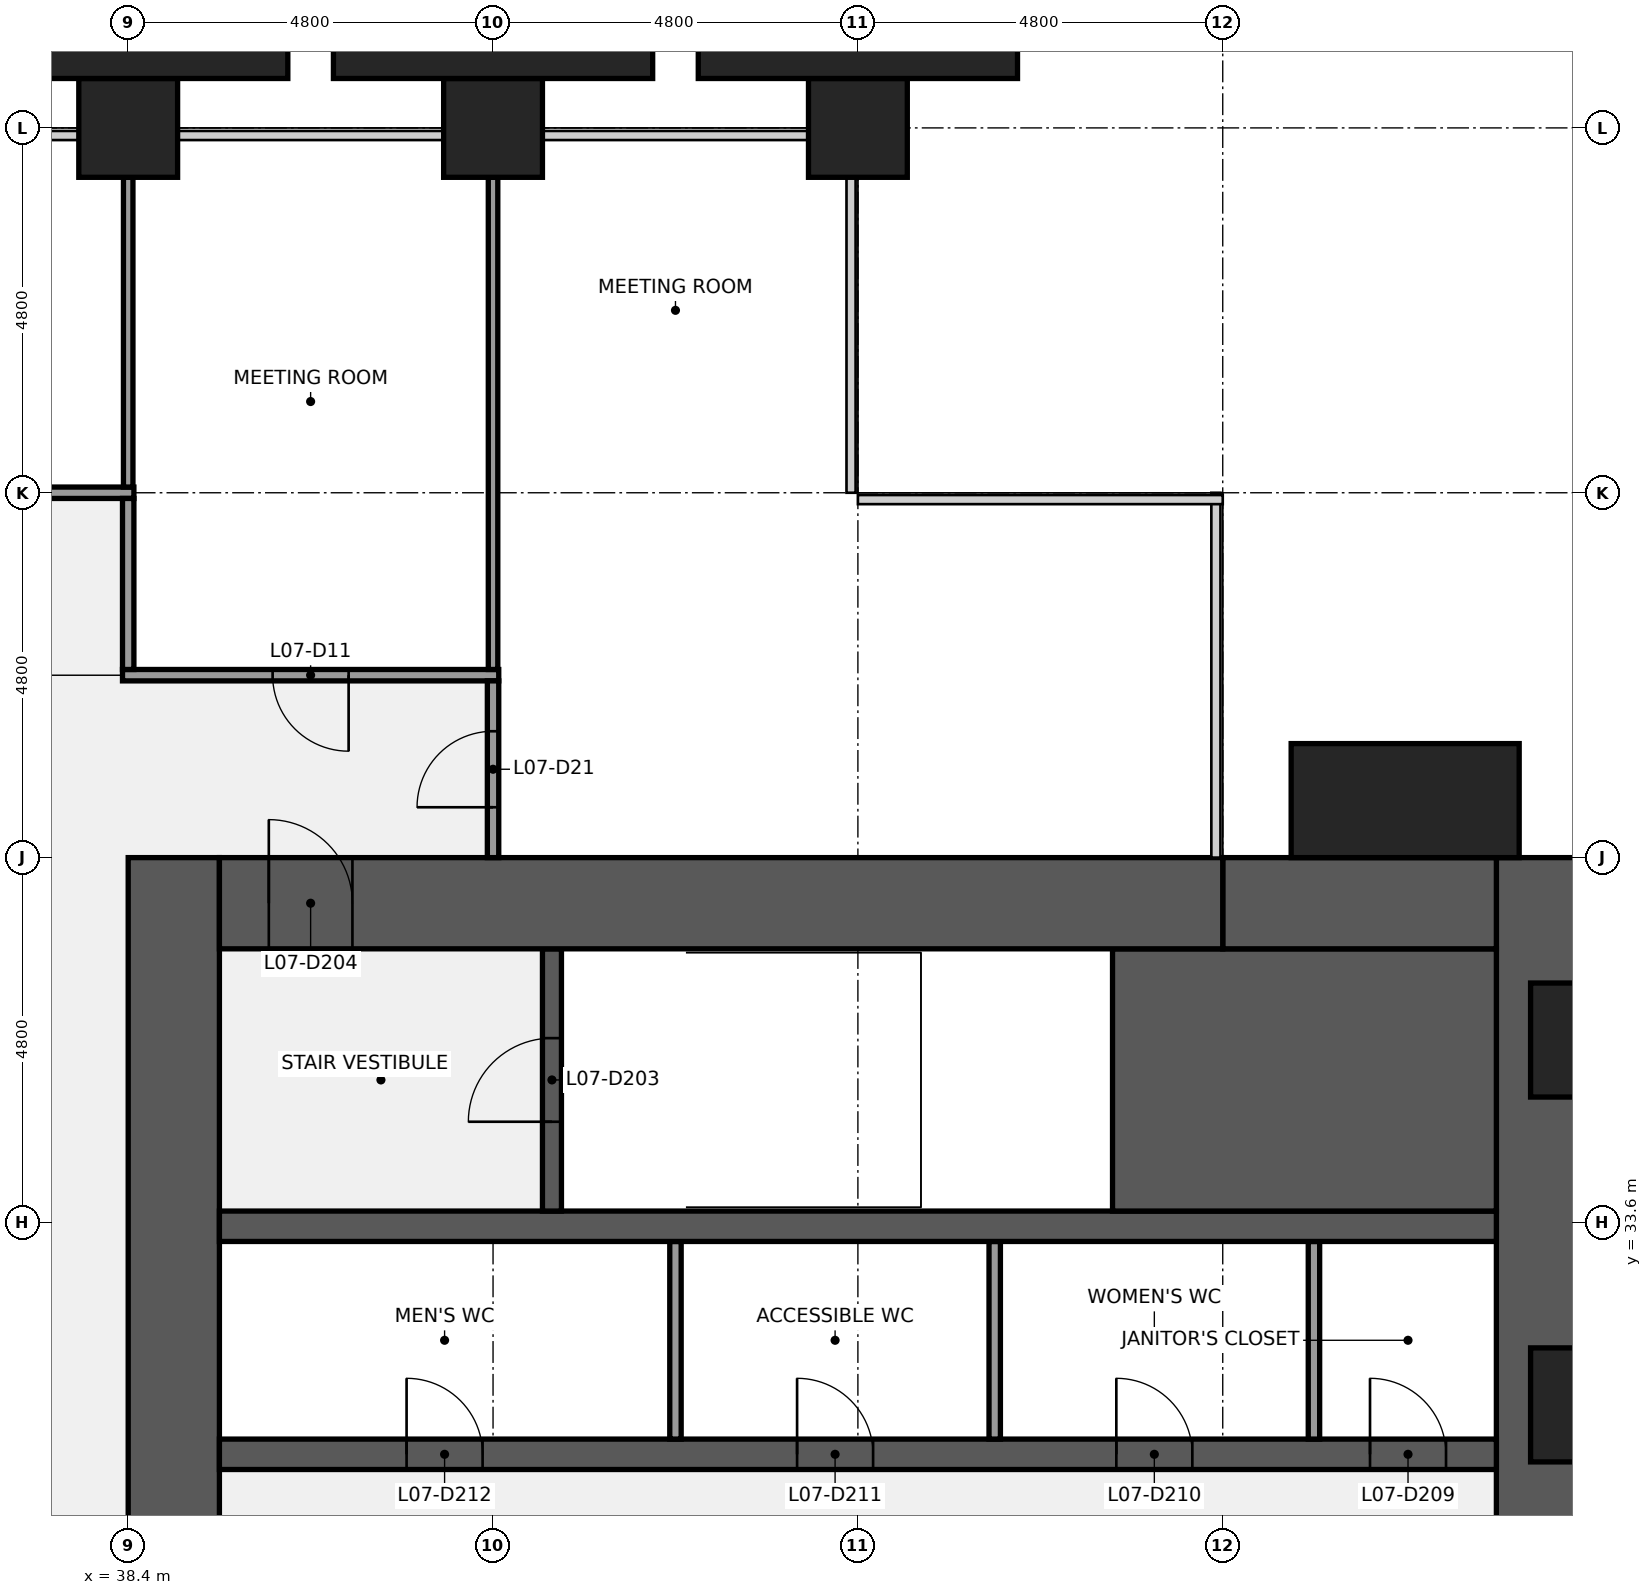
"""IFC4 building model, lengths in metres.
Left out: names, types, materials, properties, quantities, classifications, styles, units other than length and angle.
Written with IfcOpenShell. Run it as: python <this file> out.ifc"""

import sys

from ifc_helpers import new_model, si_unit, direction, frame, frame_2d, origin, origin_2d, place, context, subcontext, project, spatial, rectangle, extrude, element, fill, save


model = new_model("IFC4")
c1 = context("Model", 3, precision=1e-05, world=origin(), true_north=direction((0.0, 1.0)))
c2 = subcontext(c1, "Body", "Model", "MODEL_VIEW")
j1 = project(units=[si_unit("LENGTHUNIT", "METRE"), si_unit("PLANEANGLEUNIT", "RADIAN")], contexts=[c1])
p1 = place(None, origin())
s1 = spatial("IfcSite", under=j1, at=p1, CompositionType="ELEMENT")
p2 = place(p1, origin())
s2 = spatial("IfcBuilding", under=s1, at=p2, CompositionType="ELEMENT")
p3 = place(p2, frame((0.0, 0.0, 39.0)))
s3 = spatial("IfcBuildingStorey", under=s2, at=p3, CompositionType="ELEMENT", Elevation=39.0)
for number, where, z_axis, x_axis in (
    (1, (38.4, 48.0, 0.0), (0.0, 0.0, 1.0), (1.0, 0.0, 0.0)),
    (2, (43.2, 48.0, 0.0), (0.0, 0.0, 1.0), (1.0, 0.0, 0.0)),
    (3, (48.0, 48.0, 0.0), (0.0, 0.0, 1.0), (1.0, 0.0, 0.0)),
):
    element("IfcColumn", number, at=place(p3, frame(where, z_axis=z_axis, x_axis=x_axis)), inside=s3, PredefinedType="COLUMN", context=c2, shape_type="SweptSolid", body=[
        extrude(rectangle(XDim=1.3, YDim=1.3, at=origin_2d()), origin(), (0.0, 0.0, 1.0), 4.0),
    ])
p4 = place(p3, frame((57.0, 38.4, 0.0), z_axis=(0.0, 0.0, 1.0), x_axis=(0.0, -1.0, 0.0)))
e4 = element("IfcWall", 4, at=p4, inside=s3, PredefinedType="SHEAR", context=c2, shape_type="SweptSolid", body=[
    extrude(rectangle(XDim=28.8, YDim=1.2, at=frame_2d((14.4, 0.0))), origin(), (0.0, 0.0, 1.0), 3.84),
])
p5 = place(p4, frame((18.45, 0.0, 0.9)))
e5 = element("IfcOpeningElement", 5, at=p5, cuts=e4, PredefinedType="OPENING", context=c2, shape_type="SweptSolid", body=[
    extrude(rectangle(XDim=1.5, YDim=1.5, at=frame_2d((0.75, 0.75))), frame((0.0, 0.61, 0.0), z_axis=(0.0, -1.0, 0.0), x_axis=(1.0, 0.0, 0.0)), (0.0, 0.0, 1.0), 1.22),
])
p6 = place(p4, frame((8.85, 0.0, 0.9)))
e6 = element("IfcOpeningElement", 6, at=p6, cuts=e4, PredefinedType="OPENING", context=c2, shape_type="SweptSolid", body=[
    extrude(rectangle(XDim=1.5, YDim=1.5, at=frame_2d((0.75, 0.75))), frame((0.0, 0.61, 0.0), z_axis=(0.0, -1.0, 0.0), x_axis=(1.0, 0.0, 0.0)), (0.0, 0.0, 1.0), 1.22),
])
p7 = place(p3, frame((39.0, 9.6, 0.0), z_axis=(0.0, 0.0, 1.0), x_axis=(0.0, 1.0, 0.0)))
e7 = element("IfcWall", 7, at=p7, inside=s3, PredefinedType="SHEAR", context=c2, shape_type="SweptSolid", body=[
    extrude(rectangle(XDim=28.8, YDim=1.2, at=frame_2d((14.4, 0.0))), origin(), (0.0, 0.0, 1.0), 3.84),
])
p8 = place(p7, frame((8.7, 0.0, 0.0)))
e8 = element("IfcOpeningElement", 8, at=p8, cuts=e7, PredefinedType="OPENING", context=c2, shape_type="SweptSolid", body=[
    extrude(rectangle(XDim=1.8, YDim=2.1, at=frame_2d((0.9, 1.05))), frame((0.0, 0.61, 0.0), z_axis=(0.0, -1.0, 0.0), x_axis=(1.0, 0.0, 0.0)), (0.0, 0.0, 1.0), 1.22),
])
p9 = place(p7, frame((18.3, 0.0, 0.0)))
e9 = element("IfcOpeningElement", 9, at=p9, cuts=e7, PredefinedType="OPENING", context=c2, shape_type="SweptSolid", body=[
    extrude(rectangle(XDim=1.8, YDim=2.1, at=frame_2d((0.9, 1.05))), frame((0.0, 0.61, 0.0), z_axis=(0.0, -1.0, 0.0), x_axis=(1.0, 0.0, 0.0)), (0.0, 0.0, 1.0), 1.22),
])
p10 = place(p3, frame((39.6, 30.55, 0.0), z_axis=(0.0, 0.0, 1.0), x_axis=(1.0, 0.0, 0.0)))
e10 = element("IfcWall", 10, at=p10, inside=s3, PredefinedType="SHEAR", context=c2, shape_type="SweptSolid", body=[
    extrude(rectangle(XDim=16.8, YDim=0.4, at=frame_2d((8.4, 0.0))), origin(), (0.0, 0.0, 1.0), 3.84),
])
p11 = place(p10, frame((15.137, 0.0, 0.0)))
e11 = element("IfcOpeningElement", 11, at=p11, cuts=e10, PredefinedType="OPENING", context=c2, shape_type="SweptSolid", body=[
    extrude(rectangle(XDim=1.0, YDim=2.1, at=frame_2d((0.5, 1.05))), frame((0.0, 0.21, 0.0), z_axis=(0.0, -1.0, 0.0), x_axis=(1.0, 0.0, 0.0)), (0.0, 0.0, 1.0), 0.42),
])
p12 = place(p10, frame((11.8, 0.0, 0.0)))
e12 = element("IfcOpeningElement", 12, at=p12, cuts=e10, PredefinedType="OPENING", context=c2, shape_type="SweptSolid", body=[
    extrude(rectangle(XDim=1.0, YDim=2.1, at=frame_2d((0.5, 1.05))), frame((0.0, 0.21, 0.0), z_axis=(0.0, -1.0, 0.0), x_axis=(1.0, 0.0, 0.0)), (0.0, 0.0, 1.0), 0.42),
])
p13 = place(p10, frame((7.6, 0.0, 0.0)))
e13 = element("IfcOpeningElement", 13, at=p13, cuts=e10, PredefinedType="OPENING", context=c2, shape_type="SweptSolid", body=[
    extrude(rectangle(XDim=1.0, YDim=2.1, at=frame_2d((0.5, 1.05))), frame((0.0, 0.21, 0.0), z_axis=(0.0, -1.0, 0.0), x_axis=(1.0, 0.0, 0.0)), (0.0, 0.0, 1.0), 0.42),
])
p14 = place(p10, frame((2.462, 0.0, 0.0)))
e14 = element("IfcOpeningElement", 14, at=p14, cuts=e10, PredefinedType="OPENING", context=c2, shape_type="SweptSolid", body=[
    extrude(rectangle(XDim=1.0, YDim=2.1, at=frame_2d((0.5, 1.05))), frame((0.0, 0.21, 0.0), z_axis=(0.0, -1.0, 0.0), x_axis=(1.0, 0.0, 0.0)), (0.0, 0.0, 1.0), 0.42),
])
for number, where, z_axis, x_axis in (
    (15, (54.0, 30.75, 0.0), (0.0, 0.0, 1.0), (0.0, 1.0, 0.0)),
    (16, (49.8, 30.75, 0.0), (0.0, 0.0, 1.0), (0.0, 1.0, 0.0)),
    (17, (45.6, 30.75, 0.0), (0.0, 0.0, 1.0), (0.0, 1.0, 0.0)),
):
    element("IfcWall", number, at=place(p3, frame(where, z_axis=z_axis, x_axis=x_axis)), inside=s3, PredefinedType="PARTITIONING", context=c2, shape_type="SweptSolid", body=[
        extrude(rectangle(XDim=2.6, YDim=0.15, at=frame_2d((1.3, 0.0))), origin(), (0.0, 0.0, 1.0), 3.84),
    ])
p15 = place(p3, frame((39.6, 33.55, 0.0), z_axis=(0.0, 0.0, 1.0), x_axis=(1.0, 0.0, 0.0)))
e18 = element("IfcWall", 18, at=p15, inside=s3, PredefinedType="SHEAR", context=c2, shape_type="SweptSolid", body=[
    extrude(rectangle(XDim=16.8, YDim=0.4, at=frame_2d((8.4, 0.0))), origin(), (0.0, 0.0, 1.0), 3.84),
])
p16 = place(p3, frame((51.35, 35.475, 0.0), z_axis=(0.0, 0.0, 1.0), x_axis=(1.0, 0.0, 0.0)))
e19 = element("IfcWall", 19, at=p16, inside=s3, PredefinedType="SHEAR", context=c2, shape_type="SweptSolid", body=[
    extrude(rectangle(XDim=5.05, YDim=3.45, at=frame_2d((2.525, 0.0))), origin(), (0.0, 0.0, 1.0), 3.84),
])
p17 = place(p3, frame((43.975, 33.75, 0.0), z_axis=(0.0, 0.0, 1.0), x_axis=(0.0, 1.0, 0.0)))
e20 = element("IfcWall", 20, at=p17, inside=s3, PredefinedType="SHEAR", context=c2, shape_type="SweptSolid", body=[
    extrude(rectangle(XDim=3.45, YDim=0.25, at=frame_2d((1.725, 0.0))), origin(), (0.0, 0.0, 1.0), 3.84),
])
p18 = place(p17, frame((1.175, 0.0, 0.0)))
e21 = element("IfcOpeningElement", 21, at=p18, cuts=e20, PredefinedType="OPENING", context=c2, shape_type="SweptSolid", body=[
    extrude(rectangle(XDim=1.1, YDim=2.1, at=frame_2d((0.55, 1.05))), frame((0.0, 0.135, 0.0), z_axis=(0.0, -1.0, 0.0), x_axis=(1.0, 0.0, 0.0)), (0.0, 0.0, 1.0), 0.27),
])
p19 = place(p3, frame((52.8, 37.8, 0.0), z_axis=(0.0, 0.0, 1.0), x_axis=(1.0, 0.0, 0.0)))
e22 = element("IfcWall", 22, at=p19, inside=s3, PredefinedType="SHEAR", context=c2, shape_type="SweptSolid", body=[
    extrude(rectangle(XDim=3.6, YDim=1.2, at=frame_2d((1.8, 0.0))), origin(), (0.0, 0.0, 1.0), 3.84),
])
p20 = place(p3, frame((39.6, 37.8, 0.0), z_axis=(0.0, 0.0, 1.0), x_axis=(1.0, 0.0, 0.0)))
e23 = element("IfcWall", 23, at=p20, inside=s3, PredefinedType="SHEAR", context=c2, shape_type="SweptSolid", body=[
    extrude(rectangle(XDim=13.2, YDim=1.2, at=frame_2d((6.6, 0.0))), origin(), (0.0, 0.0, 1.0), 3.84),
])
p21 = place(p20, frame((0.65, 0.0, 0.0)))
e24 = element("IfcOpeningElement", 24, at=p21, cuts=e23, PredefinedType="OPENING", context=c2, shape_type="SweptSolid", body=[
    extrude(rectangle(XDim=1.1, YDim=2.1, at=frame_2d((0.55, 1.05))), frame((0.0, 0.61, 0.0), z_axis=(0.0, -1.0, 0.0), x_axis=(1.0, 0.0, 0.0)), (0.0, 0.0, 1.0), 1.22),
])
p22 = place(p3, frame((38.325, 40.8, 0.0), z_axis=(0.0, 0.0, 1.0), x_axis=(1.0, 0.0, 0.0)))
e25 = element("IfcWall", 25, at=p22, inside=s3, PredefinedType="PARTITIONING", context=c2, shape_type="SweptSolid", body=[
    extrude(rectangle(XDim=4.95, YDim=0.15, at=frame_2d((2.475, 0.0))), origin(), (0.0, 0.0, 1.0), 2.87),
])
p23 = place(p22, frame((1.975, 0.0, 0.0)))
e26 = element("IfcOpeningElement", 26, at=p23, cuts=e25, PredefinedType="OPENING", context=c2, shape_type="SweptSolid", body=[
    extrude(rectangle(XDim=1.0, YDim=2.1, at=frame_2d((0.5, 1.05))), frame((0.0, 0.085, 0.0), z_axis=(0.0, -1.0, 0.0), x_axis=(1.0, 0.0, 0.0)), (0.0, 0.0, 1.0), 0.17),
])
p24 = place(p3, frame((19.125, 43.2, 0.0), z_axis=(0.0, 0.0, 1.0), x_axis=(1.0, 0.0, 0.0)))
e27 = element("IfcWall", 27, at=p24, inside=s3, PredefinedType="PARTITIONING", context=c2, shape_type="SweptSolid", body=[
    extrude(rectangle(XDim=19.35, YDim=0.15, at=frame_2d((9.675, 0.0))), origin(), (0.0, 0.0, 1.0), 2.87),
])
p25 = place(p24, frame((9.175, 0.0, 0.0)))
e28 = element("IfcOpeningElement", 28, at=p25, cuts=e27, PredefinedType="OPENING", context=c2, shape_type="SweptSolid", body=[
    extrude(rectangle(XDim=1.0, YDim=2.1, at=frame_2d((0.5, 1.05))), frame((0.0, 0.085, 0.0), z_axis=(0.0, -1.0, 0.0), x_axis=(1.0, 0.0, 0.0)), (0.0, 0.0, 1.0), 0.17),
])
p26 = place(p3, frame((38.4, 43.275, 0.0), z_axis=(0.0, 0.0, 1.0), x_axis=(0.0, 1.0, 0.0)))
e29 = element("IfcWall", 29, at=p26, inside=s3, PredefinedType="PARTITIONING", context=c2, shape_type="SweptSolid", body=[
    extrude(rectangle(XDim=4.075, YDim=0.125, at=frame_2d((2.038, 0.0))), origin(), (0.0, 0.0, 1.0), 2.87),
])
p27 = place(p3, frame((38.4, 40.875, 0.0), z_axis=(0.0, 0.0, 1.0), x_axis=(0.0, 1.0, 0.0)))
e30 = element("IfcWall", 30, at=p27, inside=s3, PredefinedType="PARTITIONING", context=c2, shape_type="SweptSolid", body=[
    extrude(rectangle(XDim=2.25, YDim=0.15, at=frame_2d((1.125, 0.0))), origin(), (0.0, 0.0, 1.0), 2.87),
])
p28 = place(p3, frame((43.2, 40.875, 0.0), z_axis=(0.0, 0.0, 1.0), x_axis=(0.0, 1.0, 0.0)))
e31 = element("IfcWall", 31, at=p28, inside=s3, PredefinedType="PARTITIONING", context=c2, shape_type="SweptSolid", body=[
    extrude(rectangle(XDim=6.475, YDim=0.125, at=frame_2d((3.238, 0.0))), origin(), (0.0, 0.0, 1.0), 2.87),
])
p29 = place(p3, frame((43.2, 38.4, 0.0), z_axis=(0.0, 0.0, 1.0), x_axis=(0.0, 1.0, 0.0)))
e32 = element("IfcWall", 32, at=p29, inside=s3, PredefinedType="PARTITIONING", context=c2, shape_type="SweptSolid", body=[
    extrude(rectangle(XDim=2.325, YDim=0.15, at=frame_2d((1.163, 0.0))), origin(), (0.0, 0.0, 1.0), 2.87),
])
p30 = place(p29, frame((0.663, 0.0, 0.0)))
e33 = element("IfcOpeningElement", 33, at=p30, cuts=e32, PredefinedType="OPENING", context=c2, shape_type="SweptSolid", body=[
    extrude(rectangle(XDim=1.0, YDim=2.1, at=frame_2d((0.5, 1.05))), frame((0.0, 0.085, 0.0), z_axis=(0.0, -1.0, 0.0), x_axis=(1.0, 0.0, 0.0)), (0.0, 0.0, 1.0), 0.17),
])
p31 = place(p3, frame((55.2, 39.15, 0.0), z_axis=(0.0, 0.0, 1.0), x_axis=(1.0, 0.0, 0.0)))
e34 = element("IfcColumn", 34, at=p31, inside=s3, PredefinedType="PILASTER", context=c2, shape_type="SweptSolid", body=[
    extrude(rectangle(XDim=3.0, YDim=1.5, at=origin_2d()), origin(), (0.0, 0.0, 1.0), 4.0),
])
for number, where, z_axis, x_axis in (
    (35, (38.4, 49.075, 0.0), (0.0, 0.0, 1.0), (1.0, 0.0, 0.0)),
    (36, (43.2, 49.075, 0.0), (0.0, 0.0, 1.0), (1.0, 0.0, 0.0)),
    (37, (48.0, 49.075, 0.0), (0.0, 0.0, 1.0), (1.0, 0.0, 0.0)),
):
    element("IfcColumn", number, at=place(p3, frame(where, z_axis=z_axis, x_axis=x_axis)), inside=s3, PredefinedType="PILASTER", context=c2, shape_type="SweptSolid", body=[
        extrude(rectangle(XDim=4.2, YDim=0.85, at=origin_2d()), origin(), (0.0, 0.0, 1.0), 4.0),
    ])
p32 = place(p18, origin())
e38 = element("IfcDoor", 38, at=p32, inside=s3, OperationType="SINGLE_SWING_LEFT", PredefinedType="DOOR", context=c2, shape_type="SweptSolid", body=[
    extrude(rectangle(XDim=1.1, YDim=2.1, at=frame_2d((0.55, 1.05))), frame((0.0, 0.025, 0.0), z_axis=(0.0, -1.0, 0.0), x_axis=(1.0, 0.0, 0.0)), (0.0, 0.0, 1.0), 0.05),
])
fill(e21, e38)
p33 = place(p21, origin())
e39 = element("IfcDoor", 39, at=p33, inside=s3, OperationType="SINGLE_SWING_LEFT", PredefinedType="DOOR", context=c2, shape_type="SweptSolid", body=[
    extrude(rectangle(XDim=1.1, YDim=2.1, at=frame_2d((0.55, 1.05))), frame((0.0, 0.025, 0.0), z_axis=(0.0, -1.0, 0.0), x_axis=(1.0, 0.0, 0.0)), (0.0, 0.0, 1.0), 0.05),
])
fill(e24, e39)
p34 = place(p11, origin())
e40 = element("IfcDoor", 40, at=p34, inside=s3, OperationType="SINGLE_SWING_LEFT", PredefinedType="DOOR", context=c2, shape_type="SweptSolid", body=[
    extrude(rectangle(XDim=1.0, YDim=2.1, at=frame_2d((0.5, 1.05))), frame((0.0, 0.025, 0.0), z_axis=(0.0, -1.0, 0.0), x_axis=(1.0, 0.0, 0.0)), (0.0, 0.0, 1.0), 0.05),
])
fill(e11, e40)
p35 = place(p12, origin())
e41 = element("IfcDoor", 41, at=p35, inside=s3, OperationType="SINGLE_SWING_LEFT", PredefinedType="DOOR", context=c2, shape_type="SweptSolid", body=[
    extrude(rectangle(XDim=1.0, YDim=2.1, at=frame_2d((0.5, 1.05))), frame((0.0, 0.025, 0.0), z_axis=(0.0, -1.0, 0.0), x_axis=(1.0, 0.0, 0.0)), (0.0, 0.0, 1.0), 0.05),
])
fill(e12, e41)
p36 = place(p13, origin())
e42 = element("IfcDoor", 42, at=p36, inside=s3, OperationType="SINGLE_SWING_LEFT", PredefinedType="DOOR", context=c2, shape_type="SweptSolid", body=[
    extrude(rectangle(XDim=1.0, YDim=2.1, at=frame_2d((0.5, 1.05))), frame((0.0, 0.025, 0.0), z_axis=(0.0, -1.0, 0.0), x_axis=(1.0, 0.0, 0.0)), (0.0, 0.0, 1.0), 0.05),
])
fill(e13, e42)
p37 = place(p14, origin())
e43 = element("IfcDoor", 43, at=p37, inside=s3, OperationType="SINGLE_SWING_LEFT", PredefinedType="DOOR", context=c2, shape_type="SweptSolid", body=[
    extrude(rectangle(XDim=1.0, YDim=2.1, at=frame_2d((0.5, 1.05))), frame((0.0, 0.025, 0.0), z_axis=(0.0, -1.0, 0.0), x_axis=(1.0, 0.0, 0.0)), (0.0, 0.0, 1.0), 0.05),
])
fill(e14, e43)
p38 = place(p23, origin())
e44 = element("IfcDoor", 44, at=p38, inside=s3, OperationType="SINGLE_SWING_RIGHT", PredefinedType="DOOR", context=c2, shape_type="SweptSolid", body=[
    extrude(rectangle(XDim=1.0, YDim=2.1, at=frame_2d((0.5, 1.05))), frame((0.0, 0.025, 0.0), z_axis=(0.0, -1.0, 0.0), x_axis=(1.0, 0.0, 0.0)), (0.0, 0.0, 1.0), 0.05),
])
fill(e26, e44)
p39 = place(p30, origin())
e45 = element("IfcDoor", 45, at=p39, inside=s3, OperationType="SINGLE_SWING_LEFT", PredefinedType="DOOR", context=c2, shape_type="SweptSolid", body=[
    extrude(rectangle(XDim=1.0, YDim=2.1, at=frame_2d((0.5, 1.05))), frame((0.0, 0.025, 0.0), z_axis=(0.0, -1.0, 0.0), x_axis=(1.0, 0.0, 0.0)), (0.0, 0.0, 1.0), 0.05),
])
fill(e33, e45)
save(model, sys.argv[1])
